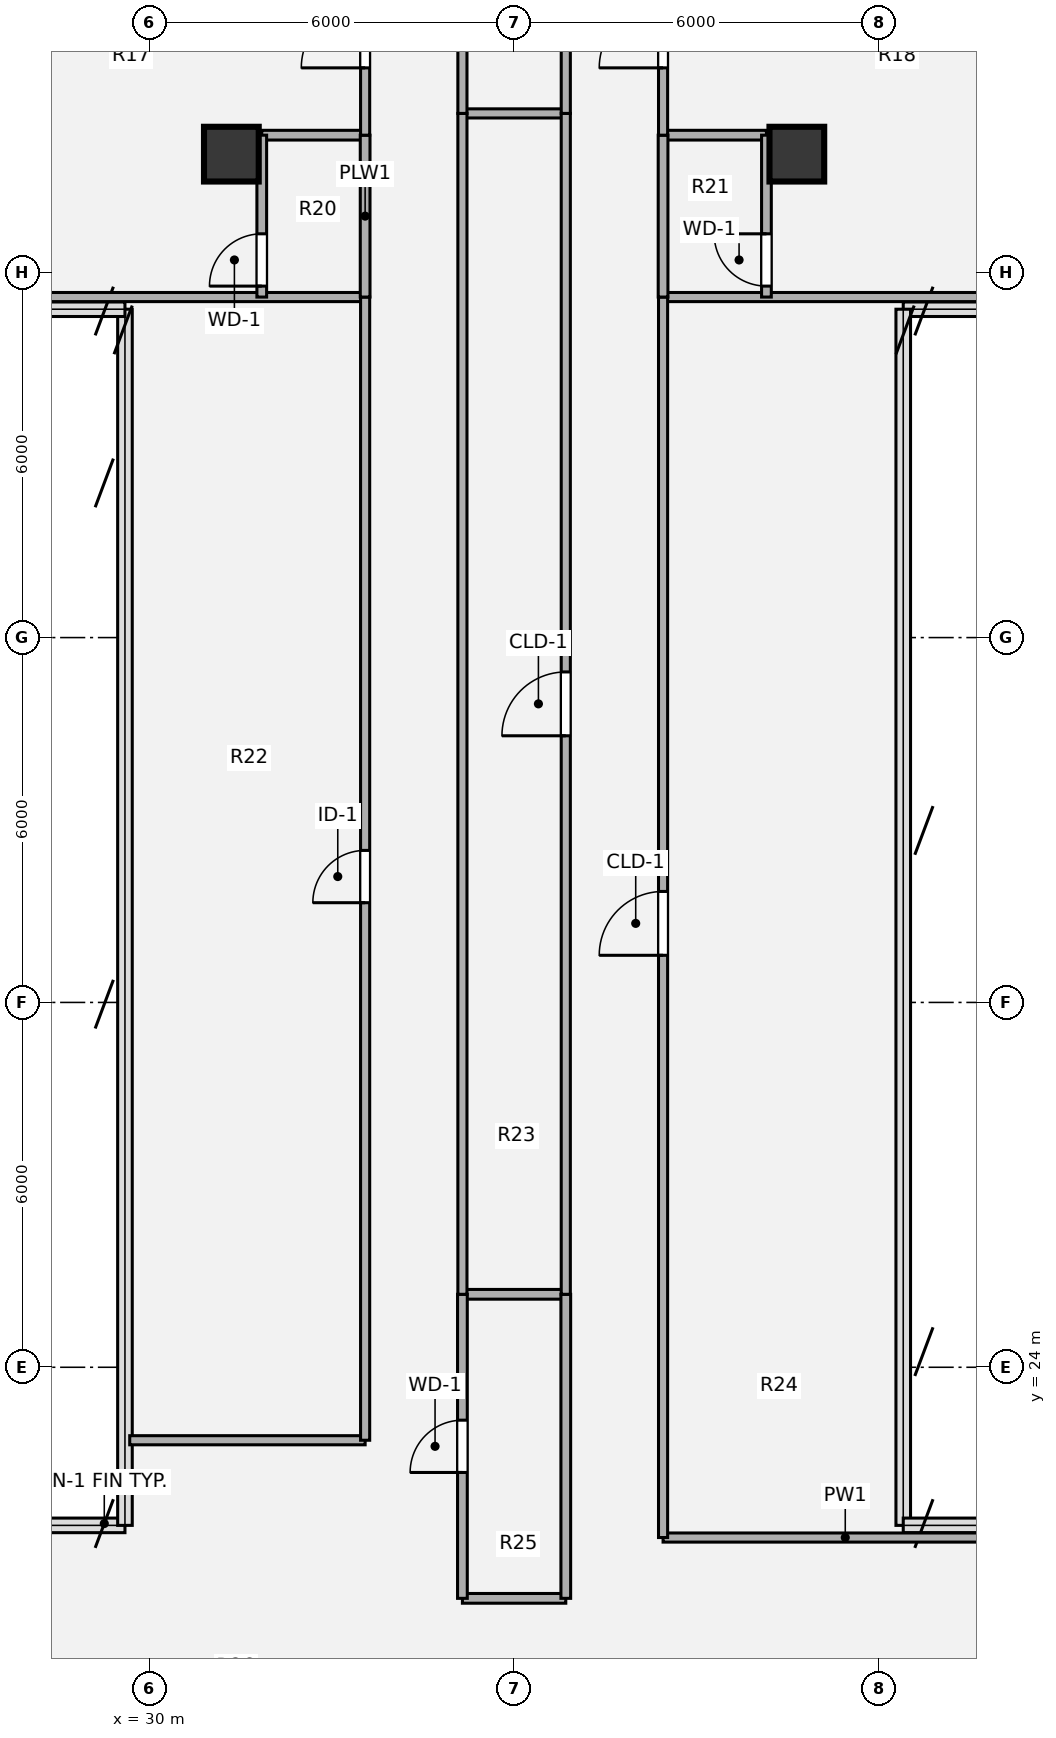
"""IFC4 building model, lengths in metres.
Left out: names, types, materials, properties, quantities, classifications, styles, units other than length and angle.
Written with IfcOpenShell. Run it as: python <this file> out.ifc"""

import sys

from ifc_helpers import new_model, si_unit, direction, frame, frame_2d, origin, origin_2d, place, context, subcontext, project, spatial, rectangle, hollow_circle, extrude, source, transform, mapped, element, fill, save


model = new_model("IFC4")
c1 = context("Model", 3, precision=1e-05, world=origin(), true_north=direction((0.0, 1.0)))
c2 = subcontext(c1, "Body", "Model", "MODEL_VIEW")
j1 = project(units=[si_unit("LENGTHUNIT", "METRE"), si_unit("PLANEANGLEUNIT", "RADIAN")], contexts=[c1])
p1 = place(None, origin())
s1 = spatial("IfcSite", under=j1, at=p1, CompositionType="ELEMENT")
p2 = place(p1, origin())
s2 = spatial("IfcBuilding", under=s1, at=p2, CompositionType="ELEMENT")
p3 = place(p2, frame((0.0, 0.0, 238.14)))
s3 = spatial("IfcBuildingStorey", under=s2, at=p3, CompositionType="ELEMENT", Elevation=238.14)
m1 = source(origin(), c2, "Body", "SweptSolid", [
    extrude(hollow_circle(Radius=0.45, WallThickness=0.032, at=origin_2d()), origin(), (0.0, 0.0, 1.0), 3.78),
])
for number, where, z_axis, x_axis in (
    (1, (31.35, 43.95, 0.0), (0.0, 0.0, 1.0), (1.0, 0.0, 0.0)),
    (2, (40.65, 43.95, 0.0), (0.0, 0.0, 1.0), (1.0, 0.0, 0.0)),
):
    element("IfcColumn", number, at=place(p3, frame(where, z_axis=z_axis, x_axis=x_axis)), inside=s3, PredefinedType="COLUMN", context=c2, shape_type="MappedRepresentation", body=[
        mapped(m1, transform((0.0, 0.0, 0.0), x_axis=(1.0, 0.0, 0.0), y_axis=(0.0, 1.0, 0.0), z_axis=(0.0, 0.0, 1.0), scale=1.0)),
    ])
p4 = place(p3, frame((35.15, 20.2, 0.0), z_axis=(0.0, 0.0, 1.0), x_axis=(1.0, 0.0, 0.0)))
e3 = element("IfcWall", 3, at=p4, inside=s3, PredefinedType="PLUMBINGWALL", context=c2, shape_type="SweptSolid", body=[
    extrude(rectangle(XDim=1.7, YDim=0.16, at=frame_2d((0.85, 0.0))), origin(), (0.0, 0.0, 1.0), 3.5),
])
p5 = place(p3, frame((38.45, 21.2, 0.0), z_axis=(0.0, 0.0, 1.0), x_axis=(1.0, 0.0, 0.0)))
e4 = element("IfcWall", 4, at=p5, inside=s3, PredefinedType="PARTITIONING", context=c2, shape_type="SweptSolid", body=[
    extrude(rectangle(XDim=5.993, YDim=0.15, at=frame_2d((2.997, 0.0))), origin(), (0.0, 0.0, 1.0), 3.5),
])
p6 = place(p3, frame((29.678, 22.8, 0.0), z_axis=(0.0, 0.0, 1.0), x_axis=(1.0, 0.0, 0.0)))
e5 = element("IfcWall", 5, at=p6, inside=s3, PredefinedType="PARTITIONING", context=c2, shape_type="SweptSolid", body=[
    extrude(rectangle(XDim=3.872, YDim=0.15, at=frame_2d((1.936, 0.0))), origin(), (0.0, 0.0, 1.0), 3.5),
])
p7 = place(p3, frame((35.15, 25.2, 0.0), z_axis=(0.0, 0.0, 1.0), x_axis=(1.0, 0.0, 0.0)))
e6 = element("IfcWall", 6, at=p7, inside=s3, PredefinedType="PLUMBINGWALL", context=c2, shape_type="SweptSolid", body=[
    extrude(rectangle(XDim=1.7, YDim=0.16, at=frame_2d((0.85, 0.0))), origin(), (0.0, 0.0, 1.0), 3.5),
])
p8 = place(p3, frame((27.558, 41.6, 0.0), z_axis=(0.0, 0.0, 1.0), x_axis=(1.0, 0.0, 0.0)))
e7 = element("IfcWall", 7, at=p8, inside=s3, PredefinedType="PARTITIONING", context=c2, shape_type="SweptSolid", body=[
    extrude(rectangle(XDim=5.992, YDim=0.15, at=frame_2d((2.996, 0.0))), origin(), (0.0, 0.0, 1.0), 3.5),
])
p9 = place(p3, frame((38.45, 41.6, 0.0), z_axis=(0.0, 0.0, 1.0), x_axis=(1.0, 0.0, 0.0)))
e8 = element("IfcWall", 8, at=p9, inside=s3, PredefinedType="PARTITIONING", context=c2, shape_type="SweptSolid", body=[
    extrude(rectangle(XDim=5.993, YDim=0.15, at=frame_2d((2.997, 0.0))), origin(), (0.0, 0.0, 1.0), 3.5),
])
for number, where, z_axis, x_axis in (
    (9, (31.85, 44.262, 0.0), (0.0, 0.0, 1.0), (1.0, 0.0, 0.0)),
    (10, (38.45, 44.262, 0.0), (0.0, 0.0, 1.0), (1.0, 0.0, 0.0)),
):
    element("IfcWall", number, at=place(p3, frame(where, z_axis=z_axis, x_axis=x_axis)), inside=s3, PredefinedType="PLUMBINGWALL", context=c2, shape_type="SweptSolid", body=[
        extrude(rectangle(XDim=1.7, YDim=0.16, at=frame_2d((0.85, 0.0))), origin(), (0.0, 0.0, 1.0), 2.903),
    ])
p10 = place(p3, frame((35.15, 44.62, 0.0), z_axis=(0.0, 0.0, 1.0), x_axis=(1.0, 0.0, 0.0)))
e11 = element("IfcWall", 11, at=p10, inside=s3, PredefinedType="PARTITIONING", context=c2, shape_type="SweptSolid", body=[
    extrude(rectangle(XDim=1.7, YDim=0.15, at=frame_2d((0.85, 0.0))), origin(), (0.0, 0.0, 1.0), 3.259),
])
p11 = place(p3, frame((31.85, 41.6, 0.0), z_axis=(0.0, 0.0, 1.0), x_axis=(0.0, 1.0, 0.0)))
e12 = element("IfcWall", 12, at=p11, inside=s3, PredefinedType="PLUMBINGWALL", context=c2, shape_type="SweptSolid", body=[
    extrude(rectangle(XDim=2.662, YDim=0.16, at=frame_2d((1.331, 0.0))), origin(), (0.0, 0.0, 1.0), 3.5),
])
p12 = place(p11, frame((0.18, 0.0, 0.0)))
e13 = element("IfcOpeningElement", 13, at=p12, cuts=e12, PredefinedType="OPENING", context=c2, shape_type="SweptSolid", body=[
    extrude(rectangle(XDim=0.86, YDim=2.1, at=origin_2d()), frame((0.43, 0.09, 1.05), z_axis=(0.0, -1.0, 0.0), x_axis=(1.0, 0.0, 0.0)), (0.0, 0.0, 1.0), 0.18),
])
p13 = place(p3, frame((33.55, 22.8, 0.0), z_axis=(0.0, 0.0, 1.0), x_axis=(0.0, 1.0, 0.0)))
e14 = element("IfcWall", 14, at=p13, inside=s3, PredefinedType="PARTITIONING", context=c2, shape_type="SweptSolid", body=[
    extrude(rectangle(XDim=18.8, YDim=0.15, at=frame_2d((9.4, 0.0))), origin(), (0.0, 0.0, 1.0), 3.5),
])
p14 = place(p13, frame((8.84, 0.0, 0.0)))
e15 = element("IfcOpeningElement", 15, at=p14, cuts=e14, PredefinedType="OPENING", context=c2, shape_type="SweptSolid", body=[
    extrude(rectangle(XDim=0.86, YDim=2.1, at=origin_2d()), frame((0.43, 0.085, 1.05), z_axis=(0.0, -1.0, 0.0), x_axis=(1.0, 0.0, 0.0)), (0.0, 0.0, 1.0), 0.17),
])
p15 = place(p3, frame((33.55, 41.6, 0.0), z_axis=(0.0, 0.0, 1.0), x_axis=(0.0, 1.0, 0.0)))
e16 = element("IfcWall", 16, at=p15, inside=s3, PredefinedType="PLUMBINGWALL", context=c2, shape_type="SweptSolid", body=[
    extrude(rectangle(XDim=2.662, YDim=0.16, at=frame_2d((1.331, 0.0))), origin(), (0.0, 0.0, 1.0), 3.5),
])
p16 = place(p3, frame((33.55, 44.262, 0.0), z_axis=(0.0, 0.0, 1.0), x_axis=(0.0, 1.0, 0.0)))
e17 = element("IfcWall", 17, at=p16, inside=s3, PredefinedType="PARTITIONING", context=c2, shape_type="SweptSolid", body=[
    extrude(rectangle(XDim=3.254, YDim=0.15, at=frame_2d((1.627, 0.0))), origin(), (0.0, 0.0, 1.0), 3.5),
])
p17 = place(p16, frame((1.107, 0.0, 0.0)))
e18 = element("IfcOpeningElement", 18, at=p17, cuts=e17, PredefinedType="OPENING", context=c2, shape_type="SweptSolid", body=[
    extrude(rectangle(XDim=1.05, YDim=2.1, at=origin_2d()), frame((0.525, 0.085, 1.05), z_axis=(0.0, -1.0, 0.0), x_axis=(1.0, 0.0, 0.0)), (0.0, 0.0, 1.0), 0.17),
])
p18 = place(p3, frame((35.15, 20.2, 0.0), z_axis=(0.0, 0.0, 1.0), x_axis=(0.0, 1.0, 0.0)))
e19 = element("IfcWall", 19, at=p18, inside=s3, PredefinedType="PLUMBINGWALL", context=c2, shape_type="SweptSolid", body=[
    extrude(rectangle(XDim=5.0, YDim=0.16, at=frame_2d((2.5, 0.0))), origin(), (0.0, 0.0, 1.0), 3.5),
])
p19 = place(p18, frame((2.07, 0.0, 0.0)))
e20 = element("IfcOpeningElement", 20, at=p19, cuts=e19, PredefinedType="OPENING", context=c2, shape_type="SweptSolid", body=[
    extrude(rectangle(XDim=0.86, YDim=2.1, at=origin_2d()), frame((0.43, 0.09, 1.05), z_axis=(0.0, -1.0, 0.0), x_axis=(1.0, 0.0, 0.0)), (0.0, 0.0, 1.0), 0.18),
])
p20 = place(p3, frame((35.15, 25.2, 0.0), z_axis=(0.0, 0.0, 1.0), x_axis=(0.0, 1.0, 0.0)))
e21 = element("IfcWall", 21, at=p20, inside=s3, PredefinedType="PARTITIONING", context=c2, shape_type="SweptSolid", body=[
    extrude(rectangle(XDim=19.42, YDim=0.15, at=frame_2d((9.71, 0.0))), origin(), (0.0, 0.0, 1.0), 3.5),
])
p21 = place(p3, frame((35.15, 44.62, 0.0), z_axis=(0.0, 0.0, 1.0), x_axis=(0.0, 1.0, 0.0)))
e22 = element("IfcWall", 22, at=p21, inside=s3, PredefinedType="PARTITIONING", context=c2, shape_type="SweptSolid", body=[
    extrude(rectangle(XDim=12.58, YDim=0.15, at=frame_2d((6.29, 0.0))), origin(), (0.0, 0.0, 1.0), 3.5),
])
p22 = place(p21, frame((5.83, 0.0, 0.0)))
e23 = element("IfcOpeningElement", 23, at=p22, cuts=e22, PredefinedType="OPENING", context=c2, shape_type="SweptSolid", body=[
    extrude(rectangle(XDim=0.86, YDim=2.1, at=origin_2d()), frame((0.43, 0.085, 1.05), z_axis=(0.0, -1.0, 0.0), x_axis=(1.0, 0.0, 0.0)), (0.0, 0.0, 1.0), 0.17),
])
p23 = place(p3, frame((36.85, 20.2, 0.0), z_axis=(0.0, 0.0, 1.0), x_axis=(0.0, 1.0, 0.0)))
e24 = element("IfcWall", 24, at=p23, inside=s3, PredefinedType="PLUMBINGWALL", context=c2, shape_type="SweptSolid", body=[
    extrude(rectangle(XDim=5.0, YDim=0.16, at=frame_2d((2.5, 0.0))), origin(), (0.0, 0.0, 1.0), 3.5),
])
p24 = place(p3, frame((36.85, 25.2, 0.0), z_axis=(0.0, 0.0, 1.0), x_axis=(0.0, 1.0, 0.0)))
e25 = element("IfcWall", 25, at=p24, inside=s3, PredefinedType="PARTITIONING", context=c2, shape_type="SweptSolid", body=[
    extrude(rectangle(XDim=19.42, YDim=0.15, at=frame_2d((9.71, 0.0))), origin(), (0.0, 0.0, 1.0), 3.5),
])
p25 = place(p24, frame((9.185, 0.0, 0.0)))
e26 = element("IfcOpeningElement", 26, at=p25, cuts=e25, PredefinedType="OPENING", context=c2, shape_type="SweptSolid", body=[
    extrude(rectangle(XDim=1.05, YDim=2.1, at=origin_2d()), frame((0.525, 0.085, 1.05), z_axis=(0.0, -1.0, 0.0), x_axis=(1.0, 0.0, 0.0)), (0.0, 0.0, 1.0), 0.17),
])
p26 = place(p3, frame((36.85, 44.62, 0.0), z_axis=(0.0, 0.0, 1.0), x_axis=(0.0, 1.0, 0.0)))
e27 = element("IfcWall", 27, at=p26, inside=s3, PredefinedType="PARTITIONING", context=c2, shape_type="SweptSolid", body=[
    extrude(rectangle(XDim=12.58, YDim=0.15, at=frame_2d((6.29, 0.0))), origin(), (0.0, 0.0, 1.0), 3.5),
])
p27 = place(p3, frame((38.45, 21.2, 0.0), z_axis=(0.0, 0.0, 1.0), x_axis=(0.0, 1.0, 0.0)))
e28 = element("IfcWall", 28, at=p27, inside=s3, PredefinedType="PARTITIONING", context=c2, shape_type="SweptSolid", body=[
    extrude(rectangle(XDim=20.4, YDim=0.15, at=frame_2d((10.2, 0.0))), origin(), (0.0, 0.0, 1.0), 3.5),
])
p28 = place(p27, frame((9.575, 0.0, 0.0)))
e29 = element("IfcOpeningElement", 29, at=p28, cuts=e28, PredefinedType="OPENING", context=c2, shape_type="SweptSolid", body=[
    extrude(rectangle(XDim=1.05, YDim=2.1, at=origin_2d()), frame((0.525, 0.085, 1.05), z_axis=(0.0, -1.0, 0.0), x_axis=(1.0, 0.0, 0.0)), (0.0, 0.0, 1.0), 0.17),
])
p29 = place(p3, frame((38.45, 41.6, 0.0), z_axis=(0.0, 0.0, 1.0), x_axis=(0.0, 1.0, 0.0)))
e30 = element("IfcWall", 30, at=p29, inside=s3, PredefinedType="PLUMBINGWALL", context=c2, shape_type="SweptSolid", body=[
    extrude(rectangle(XDim=2.662, YDim=0.16, at=frame_2d((1.331, 0.0))), origin(), (0.0, 0.0, 1.0), 3.5),
])
p30 = place(p3, frame((38.45, 44.262, 0.0), z_axis=(0.0, 0.0, 1.0), x_axis=(0.0, 1.0, 0.0)))
e31 = element("IfcWall", 31, at=p30, inside=s3, PredefinedType="PARTITIONING", context=c2, shape_type="SweptSolid", body=[
    extrude(rectangle(XDim=3.254, YDim=0.15, at=frame_2d((1.627, 0.0))), origin(), (0.0, 0.0, 1.0), 3.5),
])
p31 = place(p30, frame((1.107, 0.0, 0.0)))
e32 = element("IfcOpeningElement", 32, at=p31, cuts=e31, PredefinedType="OPENING", context=c2, shape_type="SweptSolid", body=[
    extrude(rectangle(XDim=1.05, YDim=2.1, at=origin_2d()), frame((0.525, 0.085, 1.05), z_axis=(0.0, -1.0, 0.0), x_axis=(1.0, 0.0, 0.0)), (0.0, 0.0, 1.0), 0.17),
])
p32 = place(p3, frame((40.15, 41.6, 0.0), z_axis=(0.0, 0.0, 1.0), x_axis=(0.0, 1.0, 0.0)))
e33 = element("IfcWall", 33, at=p32, inside=s3, PredefinedType="PLUMBINGWALL", context=c2, shape_type="SweptSolid", body=[
    extrude(rectangle(XDim=2.662, YDim=0.16, at=frame_2d((1.331, 0.0))), origin(), (0.0, 0.0, 1.0), 3.5),
])
p33 = place(p32, frame((0.18, 0.0, 0.0)))
e34 = element("IfcOpeningElement", 34, at=p33, cuts=e33, PredefinedType="OPENING", context=c2, shape_type="SweptSolid", body=[
    extrude(rectangle(XDim=0.86, YDim=2.1, at=origin_2d()), frame((0.43, 0.09, 1.05), z_axis=(0.0, -1.0, 0.0), x_axis=(1.0, 0.0, 0.0)), (0.0, 0.0, 1.0), 0.18),
])
m2 = source(origin(), c2, "Body", "SweptSolid", [
    extrude(rectangle(XDim=0.86, YDim=2.1, at=origin_2d()), frame((0.43, 0.025, 1.05), z_axis=(0.0, -1.0, 0.0), x_axis=(1.0, 0.0, 0.0)), (0.0, 0.0, 1.0), 0.05),
])
p34 = place(p12, origin())
e35 = element("IfcDoor", 35, at=p34, inside=s3, OperationType="SINGLE_SWING_LEFT", PredefinedType="DOOR", context=c2, shape_type="MappedRepresentation", body=[
    mapped(m2, transform((0.0, 0.0, 0.0), x_axis=(1.0, 0.0, 0.0), y_axis=(0.0, 1.0, 0.0), z_axis=(0.0, 0.0, 1.0), scale=1.0)),
])
fill(e13, e35)
m3 = source(origin(), c2, "Body", "SweptSolid", [
    extrude(rectangle(XDim=0.86, YDim=2.1, at=origin_2d()), frame((0.43, 0.025, 1.05), z_axis=(0.0, -1.0, 0.0), x_axis=(1.0, 0.0, 0.0)), (0.0, 0.0, 1.0), 0.05),
])
p35 = place(p14, origin())
e36 = element("IfcDoor", 36, at=p35, inside=s3, OperationType="SINGLE_SWING_LEFT", PredefinedType="DOOR", context=c2, shape_type="MappedRepresentation", body=[
    mapped(m3, transform((0.0, 0.0, 0.0), x_axis=(1.0, 0.0, 0.0), y_axis=(0.0, 1.0, 0.0), z_axis=(0.0, 0.0, 1.0), scale=1.0)),
])
fill(e15, e36)
m4 = source(origin(), c2, "Body", "SweptSolid", [
    extrude(rectangle(XDim=1.05, YDim=2.1, at=origin_2d()), frame((0.525, 0.025, 1.05), z_axis=(0.0, -1.0, 0.0), x_axis=(1.0, 0.0, 0.0)), (0.0, 0.0, 1.0), 0.05),
])
p36 = place(p17, origin())
e37 = element("IfcDoor", 37, at=p36, inside=s3, OperationType="SINGLE_SWING_LEFT", PredefinedType="DOOR", context=c2, shape_type="MappedRepresentation", body=[
    mapped(m4, transform((0.0, 0.0, 0.0), x_axis=(1.0, 0.0, 0.0), y_axis=(0.0, 1.0, 0.0), z_axis=(0.0, 0.0, 1.0), scale=1.0)),
])
fill(e18, e37)
p37 = place(p19, origin())
e38 = element("IfcDoor", 38, at=p37, inside=s3, OperationType="SINGLE_SWING_LEFT", PredefinedType="DOOR", context=c2, shape_type="MappedRepresentation", body=[
    mapped(m2, transform((0.0, 0.0, 0.0), x_axis=(1.0, 0.0, 0.0), y_axis=(0.0, 1.0, 0.0), z_axis=(0.0, 0.0, 1.0), scale=1.0)),
])
fill(e20, e38)
m5 = source(origin(), c2, "Body", "SweptSolid", [
    extrude(rectangle(XDim=1.05, YDim=2.1, at=origin_2d()), frame((0.525, 0.025, 1.05), z_axis=(0.0, -1.0, 0.0), x_axis=(1.0, 0.0, 0.0)), (0.0, 0.0, 1.0), 0.05),
])
p38 = place(p25, origin())
e39 = element("IfcDoor", 39, at=p38, inside=s3, OperationType="SINGLE_SWING_LEFT", PredefinedType="DOOR", context=c2, shape_type="MappedRepresentation", body=[
    mapped(m5, transform((0.0, 0.0, 0.0), x_axis=(1.0, 0.0, 0.0), y_axis=(0.0, 1.0, 0.0), z_axis=(0.0, 0.0, 1.0), scale=1.0)),
])
fill(e26, e39)
p39 = place(p28, origin())
e40 = element("IfcDoor", 40, at=p39, inside=s3, OperationType="SINGLE_SWING_LEFT", PredefinedType="DOOR", context=c2, shape_type="MappedRepresentation", body=[
    mapped(m5, transform((0.0, 0.0, 0.0), x_axis=(1.0, 0.0, 0.0), y_axis=(0.0, 1.0, 0.0), z_axis=(0.0, 0.0, 1.0), scale=1.0)),
])
fill(e29, e40)
p40 = place(p31, origin())
e41 = element("IfcDoor", 41, at=p40, inside=s3, OperationType="SINGLE_SWING_LEFT", PredefinedType="DOOR", context=c2, shape_type="MappedRepresentation", body=[
    mapped(m4, transform((0.0, 0.0, 0.0), x_axis=(1.0, 0.0, 0.0), y_axis=(0.0, 1.0, 0.0), z_axis=(0.0, 0.0, 1.0), scale=1.0)),
])
fill(e32, e41)
p41 = place(p33, origin())
e42 = element("IfcDoor", 42, at=p41, inside=s3, OperationType="SINGLE_SWING_RIGHT", PredefinedType="DOOR", context=c2, shape_type="MappedRepresentation", body=[
    mapped(m2, transform((0.0, 0.0, 0.0), x_axis=(1.0, 0.0, 0.0), y_axis=(0.0, 1.0, 0.0), z_axis=(0.0, 0.0, 1.0), scale=1.0)),
])
fill(e34, e42)
save(model, sys.argv[1])
